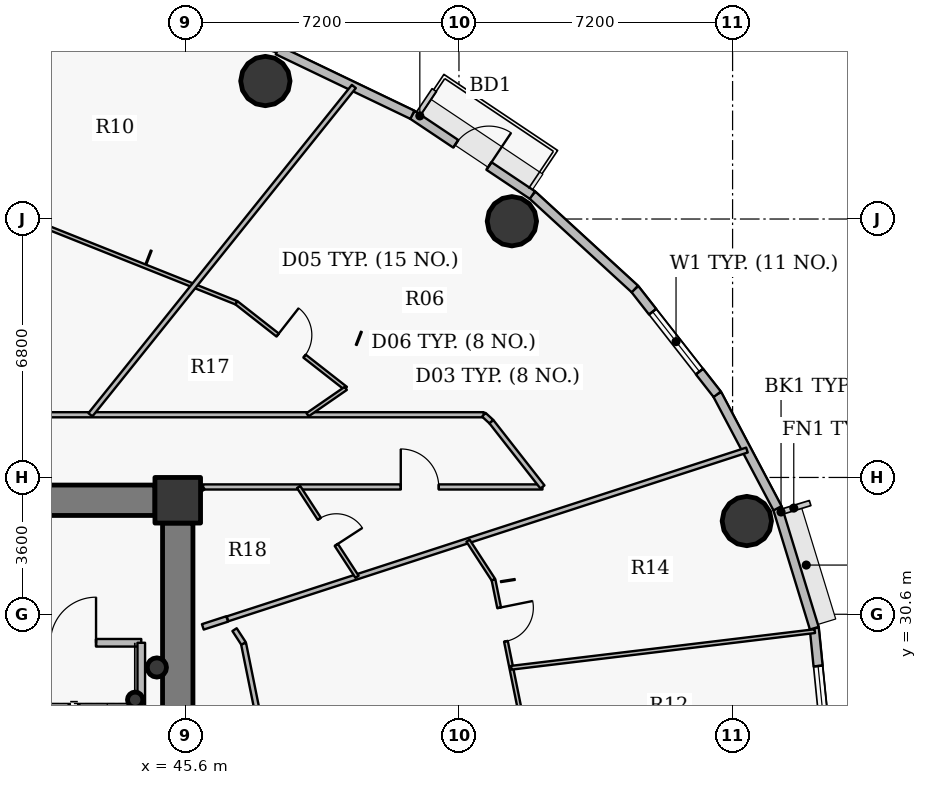
"""IFC4 building model, lengths in metres.
Left out: names, types, materials, properties, quantities, classifications, styles, units other than length and angle.
Written with IfcOpenShell. Run it as: python <this file> out.ifc"""

import sys

from ifc_helpers import new_model, si_unit, direction, frame, frame_2d, origin, origin_2d, place, context, subcontext, project, spatial, rectangle, hollow_circle, extrude, source, transform, mapped, element, fill, save


model = new_model("IFC4")
c1 = context("Model", 3, precision=1e-05, world=origin(), true_north=direction((0.0, 1.0)))
c2 = subcontext(c1, "Body", "Model", "MODEL_VIEW")
j1 = project(units=[si_unit("LENGTHUNIT", "METRE"), si_unit("PLANEANGLEUNIT", "RADIAN")], contexts=[c1])
p1 = place(None, origin())
s1 = spatial("IfcSite", under=j1, at=p1, CompositionType="ELEMENT")
p2 = place(p1, origin())
s2 = spatial("IfcBuilding", under=s1, at=p2, CompositionType="ELEMENT")
p3 = place(p2, frame((0.0, 0.0, 156.15)))
s3 = spatial("IfcBuildingStorey", under=s2, at=p3, CompositionType="ELEMENT", Elevation=156.15)
p4 = place(p3, frame((45.4, 33.6, 0.0), z_axis=(0.0, 0.0, 1.0), x_axis=(1.0, 0.0, 0.0)))
e1 = element("IfcColumn", 1, at=p4, inside=s3, PredefinedType="COLUMN", context=c2, shape_type="SweptSolid", body=[
    extrude(rectangle(XDim=1.2, YDim=1.2, at=origin_2d()), origin(), (0.0, 0.0, 1.0), 3.75),
])
p5 = place(p3, frame((44.28, 28.35, 0.0), z_axis=(0.0, 0.0, 1.0), x_axis=(1.0, 0.0, 0.0)))
e2 = element("IfcColumn", 2, at=p5, inside=s3, PredefinedType="COLUMN", context=c2, shape_type="SweptSolid", body=[
    extrude(hollow_circle(Radius=0.203, WallThickness=0.016, at=origin_2d()), origin(), (0.0, 0.0, 1.0), 3.75),
])
p6 = place(p3, frame((27.2, 33.6, 0.0), z_axis=(0.0, 0.0, 1.0), x_axis=(1.0, 0.0, 0.0)))
e3 = element("IfcWall", 3, at=p6, inside=s3, PredefinedType="SHEAR", context=c2, shape_type="SweptSolid", body=[
    extrude(rectangle(XDim=17.6, YDim=0.8, at=frame_2d((8.8, 0.0))), origin(), (0.0, 0.0, 1.0), 2.95),
])
p7 = place(p6, frame((13.45, 0.0, 0.0)))
e4 = element("IfcOpeningElement", 4, at=p7, cuts=e3, PredefinedType="OPENING", context=c2, shape_type="SweptSolid", body=[
    extrude(rectangle(XDim=1.15, YDim=2.15, at=origin_2d()), frame((0.575, 0.41, 1.075), z_axis=(0.0, -1.0, 0.0), x_axis=(1.0, 0.0, 0.0)), (0.0, 0.0, 1.0), 0.82),
])
p8 = place(p3, frame((45.4, 33.0, 0.0), z_axis=(0.0, 0.0, 1.0), x_axis=(0.0, -1.0, 0.0)))
e5 = element("IfcWall", 5, at=p8, inside=s3, PredefinedType="SHEAR", context=c2, shape_type="SweptSolid", body=[
    extrude(rectangle(XDim=12.0, YDim=0.8, at=frame_2d((6.0, 0.0))), origin(), (0.0, 0.0, 1.0), 2.95),
])
for number, where, z_axis, x_axis in (
    (6, (60.375, 33.053, 0.0), (0.0, 0.0, 1.0), (1.0, 0.0, 0.0)),
    (7, (54.192, 40.942, 0.0), (0.0, 0.0, 1.0), (1.0, 0.0, 0.0)),
    (8, (47.706, 44.631, 0.0), (0.0, 0.0, 1.0), (1.0, 0.0, 0.0)),
):
    element("IfcColumn", number, at=place(p3, frame(where, z_axis=z_axis, x_axis=x_axis)), inside=s3, PredefinedType="COLUMN", context=c2, shape_type="SweptSolid", body=[
        extrude(hollow_circle(Radius=0.65, WallThickness=0.04, at=origin_2d()), origin(), (0.0, 0.0, 1.0), 3.75),
    ])
p9 = place(p3, frame((44.85, 29.2, 0.0), z_axis=(0.0, 0.0, 1.0), x_axis=(1.0, 0.0, 0.0)))
e9 = element("IfcColumn", 9, at=p9, inside=s3, PredefinedType="COLUMN", context=c2, shape_type="SweptSolid", body=[
    extrude(hollow_circle(Radius=0.254, WallThickness=0.02, at=origin_2d()), origin(), (0.0, 0.0, 1.0), 3.75),
])
p10 = place(p3, frame((62.15, 30.234, 0.0), z_axis=(0.0, 0.0, 1.0), x_axis=(0.100061534614, -0.994981250723, 0.0)))
e10 = element("IfcWall", 10, at=p10, inside=s3, PredefinedType="SOLIDWALL", context=c2, shape_type="SweptSolid", body=[
    extrude(rectangle(XDim=3.25, YDim=0.24, at=frame_2d((1.625, 0.0))), origin(), (0.0, 0.0, 1.0), 3.5),
])
p11 = place(p10, frame((1.0, 0.0, 0.9)))
e11 = element("IfcOpeningElement", 11, at=p11, cuts=e10, PredefinedType="OPENING", context=c2, shape_type="SweptSolid", body=[
    extrude(rectangle(XDim=1.25, YDim=1.65, at=origin_2d()), frame((0.625, 0.13, 0.825), z_axis=(0.0, -1.0, 0.0), x_axis=(1.0, 0.0, 0.0)), (0.0, 0.0, 1.0), 0.26),
])
p12 = place(p3, frame((61.183, 33.389, 0.0), z_axis=(0.0, 0.0, 1.0), x_axis=(0.293097995113, -0.956082405058, 0.0)))
e12 = element("IfcWall", 12, at=p12, inside=s3, PredefinedType="SOLIDWALL", context=c2, shape_type="SweptSolid", body=[
    extrude(rectangle(XDim=3.3, YDim=0.24, at=frame_2d((1.65, 0.0))), origin(), (0.0, 0.0, 1.0), 3.5),
])
p13 = place(p3, frame((59.596, 36.388, 0.0), z_axis=(0.0, 0.0, 1.0), x_axis=(0.467586874938, -0.88394712194, 0.0)))
e13 = element("IfcWall", 13, at=p13, inside=s3, PredefinedType="SOLIDWALL", context=c2, shape_type="SweptSolid", body=[
    extrude(rectangle(XDim=3.393, YDim=0.24, at=frame_2d((1.697, 0.0))), origin(), (0.0, 0.0, 1.0), 3.5),
])
p14 = place(p3, frame((57.428, 39.158, 0.0), z_axis=(0.0, 0.0, 1.0), x_axis=(0.616287674549, -0.787521112224, 0.0)))
e14 = element("IfcWall", 14, at=p14, inside=s3, PredefinedType="SOLIDWALL", context=c2, shape_type="SweptSolid", body=[
    extrude(rectangle(XDim=3.517, YDim=0.24, at=frame_2d((1.759, 0.0))), origin(), (0.0, 0.0, 1.0), 3.5),
])
p15 = place(p14, frame((0.759, 0.0, 0.9)))
e15 = element("IfcOpeningElement", 15, at=p15, cuts=e14, PredefinedType="OPENING", context=c2, shape_type="SweptSolid", body=[
    extrude(rectangle(XDim=2.0, YDim=1.75, at=origin_2d()), frame((1.0, 0.13, 0.875), z_axis=(0.0, -1.0, 0.0), x_axis=(1.0, 0.0, 0.0)), (0.0, 0.0, 1.0), 0.26),
])
p16 = place(p3, frame((54.732, 41.631, 0.0), z_axis=(0.0, 0.0, 1.0), x_axis=(0.737076565834, -0.675809245349, 0.0)))
e16 = element("IfcWall", 16, at=p16, inside=s3, PredefinedType="SOLIDWALL", context=c2, shape_type="SweptSolid", body=[
    extrude(rectangle(XDim=3.658, YDim=0.24, at=frame_2d((1.829, 0.0))), origin(), (0.0, 0.0, 1.0), 3.5),
])
p17 = place(p3, frame((51.573, 43.743, 0.0), z_axis=(0.0, 0.0, 1.0), x_axis=(0.831228998277, -0.555930168657, 0.0)))
e17 = element("IfcWall", 17, at=p17, inside=s3, PredefinedType="SOLIDWALL", context=c2, shape_type="SweptSolid", body=[
    extrude(rectangle(XDim=3.8, YDim=0.24, at=frame_2d((1.9, 0.0))), origin(), (0.0, 0.0, 1.0), 3.5),
])
p18 = place(p17, frame((1.375, 0.0, 0.0)))
e18 = element("IfcOpeningElement", 18, at=p18, cuts=e17, PredefinedType="OPENING", context=c2, shape_type="SweptSolid", body=[
    extrude(rectangle(XDim=1.05, YDim=2.15, at=origin_2d()), frame((0.525, 0.13, 1.075), z_axis=(0.0, -1.0, 0.0), x_axis=(1.0, 0.0, 0.0)), (0.0, 0.0, 1.0), 0.26),
])
p19 = place(p3, frame((48.03, 45.444, 0.0), z_axis=(0.0, 0.0, 1.0), x_axis=(0.901564733809, -0.432644231155, 0.0)))
e19 = element("IfcWall", 19, at=p19, inside=s3, PredefinedType="SOLIDWALL", context=c2, shape_type="SweptSolid", body=[
    extrude(rectangle(XDim=3.93, YDim=0.24, at=frame_2d((1.965, 0.0))), origin(), (0.0, 0.0, 1.0), 3.5),
])
p20 = place(p3, frame((24.35, 35.85, 0.0), z_axis=(0.0, 0.0, 1.0), x_axis=(1.0, 0.0, 0.0)))
e20 = element("IfcWall", 20, at=p20, inside=s3, PredefinedType="PARTITIONING", context=c2, shape_type="SweptSolid", body=[
    extrude(rectangle(XDim=29.104, YDim=0.135, at=frame_2d((14.552, 0.0))), origin(), (0.0, 0.0, 1.0), 2.935),
])
p21 = place(p20, frame((15.972, 0.0, 0.0)))
e21 = element("IfcOpeningElement", 21, at=p21, cuts=e20, PredefinedType="OPENING", context=c2, shape_type="SweptSolid", body=[
    extrude(rectangle(XDim=1.0, YDim=2.15, at=origin_2d()), frame((0.5, 0.078, 1.075), z_axis=(0.0, -1.0, 0.0), x_axis=(1.0, 0.0, 0.0)), (0.0, 0.0, 1.0), 0.155),
])
p22 = place(p20, frame((4.074, 0.0, 0.0)))
e22 = element("IfcOpeningElement", 22, at=p22, cuts=e20, PredefinedType="OPENING", context=c2, shape_type="SweptSolid", body=[
    extrude(rectangle(XDim=1.0, YDim=2.15, at=origin_2d()), frame((0.5, 0.078, 1.075), z_axis=(0.0, -1.0, 0.0), x_axis=(1.0, 0.0, 0.0)), (0.0, 0.0, 1.0), 0.155),
])
p23 = place(p3, frame((35.95, 29.85, 0.0), z_axis=(0.0, 0.0, 1.0), x_axis=(1.0, 0.0, 0.0)))
e23 = element("IfcWall", 23, at=p23, inside=s3, PredefinedType="PARTITIONING", context=c2, shape_type="SweptSolid", body=[
    extrude(rectangle(XDim=8.49, YDim=0.2, at=frame_2d((4.245, 0.0))), origin(), (0.0, 0.0, 1.0), 3.085),
])
p24 = place(p23, frame((6.1, 0.0, 0.0)))
e24 = element("IfcOpeningElement", 24, at=p24, cuts=e23, PredefinedType="OPENING", context=c2, shape_type="SweptSolid", body=[
    extrude(rectangle(XDim=1.2, YDim=2.15, at=origin_2d()), frame((0.6, 0.11, 1.075), z_axis=(0.0, -1.0, 0.0), x_axis=(1.0, 0.0, 0.0)), (0.0, 0.0, 1.0), 0.22),
])
p25 = place(p23, frame((0.37, 0.0, 0.0)))
e25 = element("IfcOpeningElement", 25, at=p25, cuts=e23, PredefinedType="OPENING", context=c2, shape_type="SweptSolid", body=[
    extrude(rectangle(XDim=1.15, YDim=2.15, at=origin_2d()), frame((0.575, 0.11, 1.075), z_axis=(0.0, -1.0, 0.0), x_axis=(1.0, 0.0, 0.0)), (0.0, 0.0, 1.0), 0.22),
])
p26 = place(p23, frame((2.425, 0.0, 0.0)))
e26 = element("IfcOpeningElement", 26, at=p26, cuts=e23, PredefinedType="OPENING", context=c2, shape_type="SweptSolid", body=[
    extrude(rectangle(XDim=1.05, YDim=2.15, at=origin_2d()), frame((0.525, 0.11, 1.075), z_axis=(0.0, -1.0, 0.0), x_axis=(1.0, 0.0, 0.0)), (0.0, 0.0, 1.0), 0.22),
])
p27 = place(p3, frame((41.754, 40.867, 0.0), z_axis=(0.0, 0.0, 1.0), x_axis=(0.928789673623, -0.370607261359, 0.0)))
e27 = element("IfcWall", 27, at=p27, inside=s3, PredefinedType="PARTITIONING", context=c2, shape_type="SweptSolid", body=[
    extrude(rectangle(XDim=5.589, YDim=0.1, at=frame_2d((2.794, 0.0))), origin(), (0.0, 0.0, 1.0), 2.935),
])
p28 = place(p3, frame((43.102, 35.85, 0.0), z_axis=(0.0, 0.0, 1.0), x_axis=(0.62588794771, 0.779912993168, 0.0)))
e28 = element("IfcWall", 28, at=p28, inside=s3, PredefinedType="PARTITIONING", context=c2, shape_type="SweptSolid", body=[
    extrude(rectangle(XDim=11.075, YDim=0.135, at=frame_2d((5.538, 0.0))), origin(), (0.0, 0.0, 1.0), 2.935),
])
p29 = place(p3, frame((44.44, 21.33, 0.0), z_axis=(0.0, 0.0, 1.0), x_axis=(0.0, 1.0, 0.0)))
e29 = element("IfcWall", 29, at=p29, inside=s3, PredefinedType="PARTITIONING", context=c2, shape_type="SweptSolid", body=[
    extrude(rectangle(XDim=8.52, YDim=0.2, at=frame_2d((4.26, 0.0))), origin(), (0.0, 0.0, 1.0), 3.5),
])
p30 = place(p3, frame((46.065, 33.95, 0.0), z_axis=(0.0, 0.0, 1.0), x_axis=(1.0, 0.0, 0.0)))
e30 = element("IfcWall", 30, at=p30, inside=s3, PredefinedType="PARTITIONING", context=c2, shape_type="SweptSolid", body=[
    extrude(rectangle(XDim=8.932, YDim=0.135, at=frame_2d((4.466, 0.0))), origin(), (0.0, 0.0, 1.0), 3.185),
])
p31 = place(p30, frame((5.204, 0.0, 0.0)))
e31 = element("IfcOpeningElement", 31, at=p31, cuts=e30, PredefinedType="OPENING", context=c2, shape_type="SweptSolid", body=[
    extrude(rectangle(XDim=1.0, YDim=2.15, at=origin_2d()), frame((0.5, 0.078, 1.075), z_axis=(0.0, -1.0, 0.0), x_axis=(1.0, 0.0, 0.0)), (0.0, 0.0, 1.0), 0.155),
])
p32 = place(p3, frame((46.71, 30.48, 0.0), z_axis=(0.0, 0.0, 1.0), x_axis=(0.951054665008, 0.309022691992, 0.0)))
e32 = element("IfcWall", 32, at=p32, inside=s3, PredefinedType="PARTITIONING", context=c2, shape_type="SweptSolid", body=[
    extrude(rectangle(XDim=14.372, YDim=0.135, at=frame_2d((7.186, 0.0))), origin(), (0.0, 0.0, 1.0), 2.935),
])
p33 = place(p3, frame((46.945, 38.796, 0.0), z_axis=(0.0, 0.0, 1.0), x_axis=(0.787307530322, -0.616560502058, 0.0)))
e33 = element("IfcWall", 33, at=p33, inside=s3, PredefinedType="PARTITIONING", context=c2, shape_type="SweptSolid", body=[
    extrude(rectangle(XDim=3.653, YDim=0.1, at=frame_2d((1.827, 0.0))), origin(), (0.0, 0.0, 1.0), 2.935),
])
p34 = place(p33, frame((1.377, 0.0, 0.0)))
e34 = element("IfcOpeningElement", 34, at=p34, cuts=e33, PredefinedType="OPENING", context=c2, shape_type="SweptSolid", body=[
    extrude(rectangle(XDim=0.9, YDim=2.1, at=origin_2d()), frame((0.45, 0.06, 1.05), z_axis=(0.0, -1.0, 0.0), x_axis=(1.0, 0.0, 0.0)), (0.0, 0.0, 1.0), 0.12),
])
p35 = place(p3, frame((48.58, 33.95, 0.0), z_axis=(0.0, 0.0, 1.0), x_axis=(0.545393120499, -0.838180376836, 0.0)))
e35 = element("IfcWall", 35, at=p35, inside=s3, PredefinedType="PARTITIONING", context=c2, shape_type="SweptSolid", body=[
    extrude(rectangle(XDim=2.819, YDim=0.1, at=frame_2d((1.41, 0.0))), origin(), (0.0, 0.0, 1.0), 3.5),
])
p36 = place(p35, frame((1.0, 0.0, 0.0)))
e36 = element("IfcOpeningElement", 36, at=p36, cuts=e35, PredefinedType="OPENING", context=c2, shape_type="SweptSolid", body=[
    extrude(rectangle(XDim=0.82, YDim=2.1, at=origin_2d()), frame((0.41, 0.06, 1.05), z_axis=(0.0, -1.0, 0.0), x_axis=(1.0, 0.0, 0.0)), (0.0, 0.0, 1.0), 0.12),
])
p37 = place(p3, frame((48.816, 35.85, 0.0), z_axis=(0.0, 0.0, 1.0), x_axis=(0.822832340307, 0.568284206841, 0.0)))
e37 = element("IfcWall", 37, at=p37, inside=s3, PredefinedType="PARTITIONING", context=c2, shape_type="SweptSolid", body=[
    extrude(rectangle(XDim=1.221, YDim=0.1, at=frame_2d((0.61, 0.0))), origin(), (0.0, 0.0, 1.0), 3.185),
])
p38 = place(p3, frame((53.038, 32.536, 0.0), z_axis=(0.0, 0.0, 1.0), x_axis=(0.545407162254, -0.83817123988, 0.0)))
e38 = element("IfcWall", 38, at=p38, inside=s3, PredefinedType="PARTITIONING", context=c2, shape_type="SweptSolid", body=[
    extrude(rectangle(XDim=1.229, YDim=0.1, at=frame_2d((0.615, 0.0))), origin(), (0.0, 0.0, 1.0), 2.935),
])
p39 = place(p3, frame((53.454, 35.85, 0.0), z_axis=(0.0, 0.0, 1.0), x_axis=(0.736667385572, -0.676255249913, 0.0)))
e39 = element("IfcWall", 39, at=p39, inside=s3, PredefinedType="PARTITIONING", context=c2, shape_type="SweptSolid", body=[
    extrude(rectangle(XDim=0.271, YDim=0.135, at=frame_2d((0.135, 0.0))), origin(), (0.0, 0.0, 1.0), 3.5),
])
p40 = place(p3, frame((53.653, 35.667, 0.0), z_axis=(0.0, 0.0, 1.0), x_axis=(0.616302223209, -0.787509726713, 0.0)))
e40 = element("IfcWall", 40, at=p40, inside=s3, PredefinedType="PARTITIONING", context=c2, shape_type="SweptSolid", body=[
    extrude(rectangle(XDim=2.18, YDim=0.135, at=frame_2d((1.09, 0.0))), origin(), (0.0, 0.0, 1.0), 3.5),
])
p41 = place(p3, frame((53.709, 31.506, 0.0), z_axis=(0.0, 0.0, 1.0), x_axis=(0.198209478932, -0.980159682124, 0.0)))
e41 = element("IfcWall", 41, at=p41, inside=s3, PredefinedType="PARTITIONING", context=c2, shape_type="SweptSolid", body=[
    extrude(rectangle(XDim=4.597, YDim=0.1, at=frame_2d((2.298, 0.0))), origin(), (0.0, 0.0, 1.0), 2.935),
])
p42 = place(p41, frame((0.75, 0.0, 0.0)))
e42 = element("IfcOpeningElement", 42, at=p42, cuts=e41, PredefinedType="OPENING", context=c2, shape_type="SweptSolid", body=[
    extrude(rectangle(XDim=0.9, YDim=2.1, at=origin_2d()), frame((0.45, 0.06, 1.05), z_axis=(0.0, -1.0, 0.0), x_axis=(1.0, 0.0, 0.0)), (0.0, 0.0, 1.0), 0.12),
])
p43 = place(p3, frame((54.177, 29.193, 0.0), z_axis=(0.0, 0.0, 1.0), x_axis=(0.992799222866, 0.119790246168, 0.0)))
e43 = element("IfcWall", 43, at=p43, inside=s3, PredefinedType="PARTITIONING", context=c2, shape_type="SweptSolid", body=[
    extrude(rectangle(XDim=8.044, YDim=0.1, at=frame_2d((4.022, 0.0))), origin(), (0.0, 0.0, 1.0), 2.935),
])
p44 = place(p3, frame((45.8, 34.0, 0.0), z_axis=(0.0, 0.0, 1.0), x_axis=(-1.0, 0.0, 0.0)))
e44 = element("IfcWall", 44, at=p44, inside=s3, PredefinedType="PARTITIONING", context=c2, shape_type="SweptSolid", body=[
    extrude(rectangle(XDim=0.99, YDim=0.135, at=frame_2d((0.495, 0.0))), origin(), (0.0, 0.0, 1.0), 2.935),
])
p45 = place(p3, frame((45.8, 33.01, 0.0), z_axis=(0.0, 0.0, 1.0), x_axis=(0.0, 1.0, 0.0)))
e45 = element("IfcWall", 45, at=p45, inside=s3, PredefinedType="PARTITIONING", context=c2, shape_type="SweptSolid", body=[
    extrude(rectangle(XDim=0.682, YDim=0.15, at=frame_2d((0.341, 0.0))), origin(), (0.0, 0.0, 1.0), 3.185),
])
p46 = place(p3, frame((45.8, 33.767, 0.0), z_axis=(0.0, 0.0, 1.0), x_axis=(0.823065918238, 0.56794585502, 0.0)))
e46 = element("IfcWall", 46, at=p46, inside=s3, PredefinedType="PARTITIONING", context=c2, shape_type="SweptSolid", body=[
    extrude(rectangle(XDim=0.322, YDim=0.15, at=frame_2d((0.161, 0.0))), origin(), (0.0, 0.0, 1.0), 3.185),
])
p47 = place(p3, frame((46.7, 30.477, 0.0), z_axis=(0.0, 0.0, 1.0), x_axis=(-0.951050060735, -0.309036861841, 0.0)))
e47 = element("IfcWall", 47, at=p47, inside=s3, PredefinedType="PARTITIONING", context=c2, shape_type="SweptSolid", body=[
    extrude(rectangle(XDim=0.673, YDim=0.15, at=frame_2d((0.336, 0.0))), origin(), (0.0, 0.0, 1.0), 3.5),
])
p48 = place(p3, frame((47.704, 27.0, 0.0), z_axis=(0.0, 0.0, 1.0), x_axis=(-0.198292837027, 0.980142821625, 0.0)))
e48 = element("IfcWall", 48, at=p48, inside=s3, PredefinedType="PARTITIONING", context=c2, shape_type="SweptSolid", body=[
    extrude(rectangle(XDim=2.89, YDim=0.135, at=frame_2d((1.445, 0.0))), origin(), (0.0, 0.0, 1.0), 2.935),
])
p49 = place(p3, frame((47.131, 29.832, 0.0), z_axis=(0.0, 0.0, 1.0), x_axis=(-0.545305123916, 0.838237628499, 0.0)))
e49 = element("IfcWall", 49, at=p49, inside=s3, PredefinedType="PARTITIONING", context=c2, shape_type="SweptSolid", body=[
    extrude(rectangle(XDim=0.433, YDim=0.135, at=frame_2d((0.217, 0.0))), origin(), (0.0, 0.0, 1.0), 2.935),
])
m1 = source(origin(), c2, "Body", "SweptSolid", [
    extrude(rectangle(XDim=2.0, YDim=1.75, at=origin_2d()), frame((1.0, 0.03, 0.875), z_axis=(0.0, -1.0, 0.0), x_axis=(1.0, 0.0, 0.0)), (0.0, 0.0, 1.0), 0.06),
])
p50 = place(p15, origin())
e50 = element("IfcWindow", 50, at=p50, inside=s3, PartitioningType="DOUBLE_PANEL_VERTICAL", PredefinedType="WINDOW", context=c2, shape_type="MappedRepresentation", body=[
    mapped(m1, transform((0.0, 0.0, 0.0), x_axis=(1.0, 0.0, 0.0), y_axis=(0.0, 1.0, 0.0), z_axis=(0.0, 0.0, 1.0), scale=1.0)),
])
fill(e15, e50)
m2 = source(origin(), c2, "Body", "SweptSolid", [
    extrude(rectangle(XDim=1.05, YDim=2.15, at=origin_2d()), frame((0.525, 0.025, 1.075), z_axis=(0.0, -1.0, 0.0), x_axis=(1.0, 0.0, 0.0)), (0.0, 0.0, 1.0), 0.05),
])
p51 = place(p18, origin())
e51 = element("IfcDoor", 51, at=p51, inside=s3, OperationType="SINGLE_SWING_RIGHT", PredefinedType="DOOR", context=c2, shape_type="MappedRepresentation", body=[
    mapped(m2, transform((0.0, 0.0, 0.0), x_axis=(1.0, 0.0, 0.0), y_axis=(0.0, 1.0, 0.0), z_axis=(0.0, 0.0, 1.0), scale=1.0)),
])
fill(e18, e51)
m3 = source(origin(), c2, "Body", "SweptSolid", [
    extrude(rectangle(XDim=1.25, YDim=1.65, at=origin_2d()), frame((0.625, 0.03, 0.825), z_axis=(0.0, -1.0, 0.0), x_axis=(1.0, 0.0, 0.0)), (0.0, 0.0, 1.0), 0.06),
])
p52 = place(p11, origin())
e52 = element("IfcWindow", 52, at=p52, inside=s3, PartitioningType="SINGLE_PANEL", PredefinedType="WINDOW", context=c2, shape_type="MappedRepresentation", body=[
    mapped(m3, transform((0.0, 0.0, 0.0), x_axis=(1.0, 0.0, 0.0), y_axis=(0.0, 1.0, 0.0), z_axis=(0.0, 0.0, 1.0), scale=1.0)),
])
fill(e11, e52)
m4 = source(origin(), c2, "Body", "SweptSolid", [
    extrude(rectangle(XDim=1.2, YDim=2.15, at=origin_2d()), frame((0.6, 0.025, 1.075), z_axis=(0.0, -1.0, 0.0), x_axis=(1.0, 0.0, 0.0)), (0.0, 0.0, 1.0), 0.05),
])
p53 = place(p24, origin())
e53 = element("IfcDoor", 53, at=p53, inside=s3, OperationType="SINGLE_SWING_RIGHT", PredefinedType="DOOR", context=c2, shape_type="MappedRepresentation", body=[
    mapped(m4, transform((0.0, 0.0, 0.0), x_axis=(1.0, 0.0, 0.0), y_axis=(0.0, 1.0, 0.0), z_axis=(0.0, 0.0, 1.0), scale=1.0)),
])
fill(e24, e53)
m5 = source(origin(), c2, "Body", "SweptSolid", [
    extrude(rectangle(XDim=1.0, YDim=2.15, at=origin_2d()), frame((0.5, 0.025, 1.075), z_axis=(0.0, -1.0, 0.0), x_axis=(1.0, 0.0, 0.0)), (0.0, 0.0, 1.0), 0.05),
])
p54 = place(p31, origin())
e54 = element("IfcDoor", 54, at=p54, inside=s3, OperationType="SINGLE_SWING_LEFT", PredefinedType="DOOR", context=c2, shape_type="MappedRepresentation", body=[
    mapped(m5, transform((0.0, 0.0, 0.0), x_axis=(1.0, 0.0, 0.0), y_axis=(0.0, 1.0, 0.0), z_axis=(0.0, 0.0, 1.0), scale=1.0)),
])
fill(e31, e54)
m6 = source(origin(), c2, "Body", "SweptSolid", [
    extrude(rectangle(XDim=0.82, YDim=2.1, at=origin_2d()), frame((0.41, 0.025, 1.05), z_axis=(0.0, -1.0, 0.0), x_axis=(1.0, 0.0, 0.0)), (0.0, 0.0, 1.0), 0.05),
])
p55 = place(p36, origin())
e55 = element("IfcDoor", 55, at=p55, inside=s3, OperationType="SINGLE_SWING_RIGHT", PredefinedType="DOOR", context=c2, shape_type="MappedRepresentation", body=[
    mapped(m6, transform((0.0, 0.0, 0.0), x_axis=(1.0, 0.0, 0.0), y_axis=(0.0, 1.0, 0.0), z_axis=(0.0, 0.0, 1.0), scale=1.0)),
])
fill(e36, e55)
m7 = source(origin(), c2, "Body", "SweptSolid", [
    extrude(rectangle(XDim=0.9, YDim=2.1, at=origin_2d()), frame((0.45, 0.025, 1.05), z_axis=(0.0, -1.0, 0.0), x_axis=(1.0, 0.0, 0.0)), (0.0, 0.0, 1.0), 0.05),
])
p56 = place(p34, origin())
e56 = element("IfcDoor", 56, at=p56, inside=s3, OperationType="SINGLE_SWING_LEFT", PredefinedType="DOOR", context=c2, shape_type="MappedRepresentation", body=[
    mapped(m7, transform((0.0, 0.0, 0.0), x_axis=(1.0, 0.0, 0.0), y_axis=(0.0, 1.0, 0.0), z_axis=(0.0, 0.0, 1.0), scale=1.0)),
])
fill(e34, e56)
p57 = place(p42, origin())
e57 = element("IfcDoor", 57, at=p57, inside=s3, OperationType="SINGLE_SWING_LEFT", PredefinedType="DOOR", context=c2, shape_type="MappedRepresentation", body=[
    mapped(m7, transform((0.0, 0.0, 0.0), x_axis=(1.0, 0.0, 0.0), y_axis=(0.0, 1.0, 0.0), z_axis=(0.0, 0.0, 1.0), scale=1.0)),
])
fill(e42, e57)
save(model, sys.argv[1])
